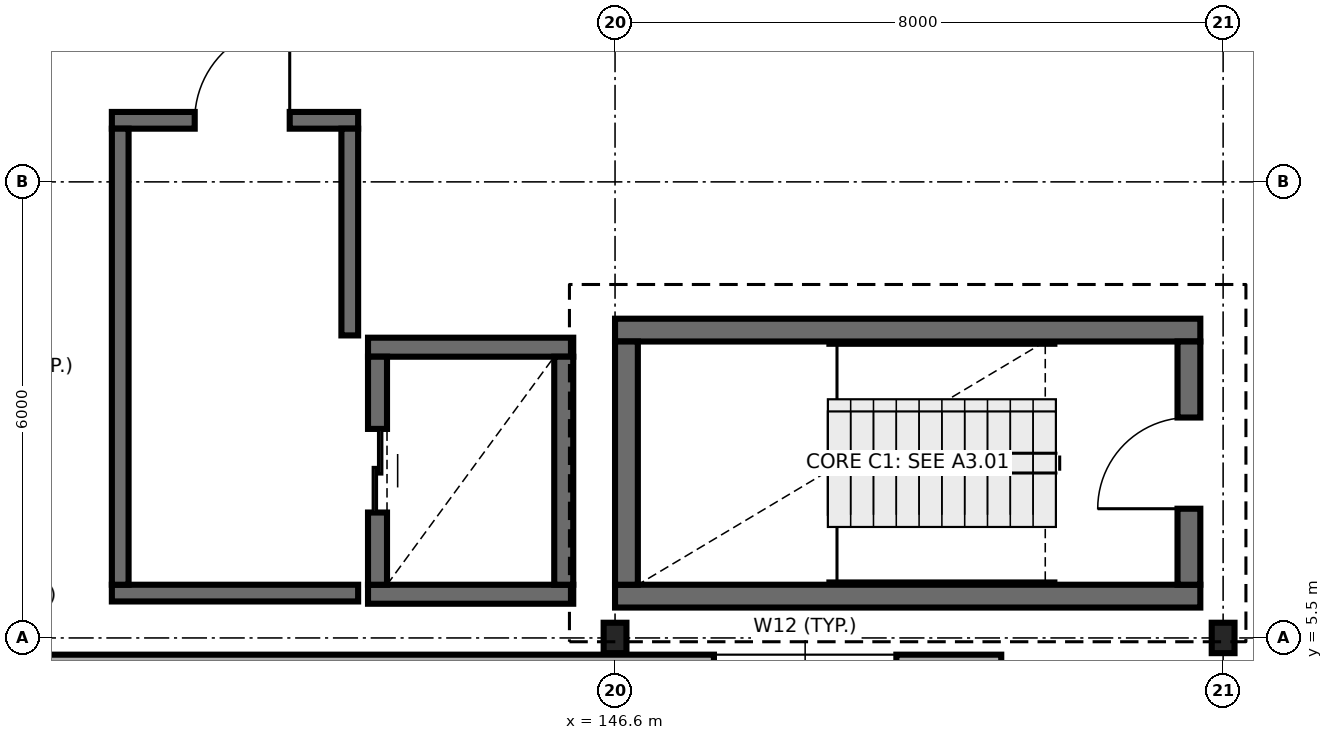
"""IFC4 building model, lengths in metres.
Left out: names, types, materials, properties, quantities, classifications, styles, units other than length and angle.
Written with IfcOpenShell. Run it as: python <this file> out.ifc"""

import sys

from ifc_helpers import new_model, si_unit, direction, frame, frame_2d, origin, origin_2d, place, context, subcontext, project, spatial, rectangle, i_section, extrude, element, fill, save


model = new_model("IFC4")
c1 = context("Model", 3, precision=1e-05, world=origin(), true_north=direction((0.0, 1.0)))
c2 = subcontext(c1, "Body", "Model", "MODEL_VIEW")
j1 = project(units=[si_unit("LENGTHUNIT", "METRE"), si_unit("PLANEANGLEUNIT", "RADIAN")], contexts=[c1])
p1 = place(None, origin())
s1 = spatial("IfcSite", under=j1, at=p1, CompositionType="ELEMENT")
p2 = place(p1, origin())
s2 = spatial("IfcBuilding", under=s1, at=p2, CompositionType="ELEMENT")
p3 = place(p2, frame((0.0, 0.0, 38.4)))
s3 = spatial("IfcBuildingStorey", under=s2, at=p3, CompositionType="ELEMENT", Elevation=38.4)
for number, where, z_axis, x_axis in (
    (1, (146.6, 5.5, 0.0), (0.0, 0.0, 1.0), (1.0, 0.0, 0.0)),
    (2, (154.6, 5.5, 0.0), (0.0, 0.0, 1.0), (1.0, 0.0, 0.0)),
):
    element("IfcColumn", number, at=place(p3, frame(where, z_axis=z_axis, x_axis=x_axis)), inside=s3, PredefinedType="COLUMN", context=c2, shape_type="SweptSolid", body=[
        extrude(i_section(OverallWidth=0.3, OverallDepth=0.4, WebThickness=0.013, FlangeThickness=0.024, FilletRadius=0.027, at=origin_2d()), origin(), (0.0, 0.0, 1.0), 3.9),
    ])
for number, where, z_axis, x_axis in (
    (3, (146.6, 6.05, 0.0), (0.0, 0.0, 1.0), (1.0, 0.0, 0.0)),
    (4, (154.3, 9.55, 0.0), (0.0, 0.0, 1.0), (-1.0, 0.0, 0.0)),
):
    element("IfcWall", number, at=place(p3, frame(where, z_axis=z_axis, x_axis=x_axis)), inside=s3, PredefinedType="SHEAR", context=c2, shape_type="SweptSolid", body=[
        extrude(rectangle(XDim=7.7, YDim=0.3, at=frame_2d((3.85, 0.0))), origin(), (0.0, 0.0, 1.0), 3.9),
    ])
p4 = place(p3, frame((146.75, 9.4, 0.0), z_axis=(0.0, 0.0, 1.0), x_axis=(0.0, -1.0, 0.0)))
e5 = element("IfcWall", 5, at=p4, inside=s3, PredefinedType="SHEAR", context=c2, shape_type="SweptSolid", body=[
    extrude(rectangle(XDim=3.2, YDim=0.3, at=frame_2d((1.6, 0.0))), origin(), (0.0, 0.0, 1.0), 3.9),
])
p5 = place(p3, frame((154.15, 6.2, 0.0), z_axis=(0.0, 0.0, 1.0), x_axis=(0.0, 1.0, 0.0)))
e6 = element("IfcWall", 6, at=p5, inside=s3, PredefinedType="SHEAR", context=c2, shape_type="SweptSolid", body=[
    extrude(rectangle(XDim=3.2, YDim=0.3, at=frame_2d((1.6, 0.0))), origin(), (0.0, 0.0, 1.0), 3.9),
])
p6 = place(p5, frame((1.0, 0.0, 0.0)))
e7 = element("IfcOpeningElement", 7, at=p6, cuts=e6, PredefinedType="OPENING", context=c2, shape_type="SweptSolid", body=[
    extrude(rectangle(XDim=1.2, YDim=2.15, at=frame_2d((0.6, 1.075))), frame((0.0, 0.16, 0.0), z_axis=(0.0, -1.0, 0.0), x_axis=(1.0, 0.0, 0.0)), (0.0, 0.0, 1.0), 0.32),
])
for number, where, z_axis, x_axis in (
    (8, (143.35, 6.075, 0.0), (0.0, 0.0, 1.0), (1.0, 0.0, 0.0)),
    (9, (146.05, 9.325, 0.0), (0.0, 0.0, 1.0), (-1.0, 0.0, 0.0)),
):
    element("IfcWall", number, at=place(p3, frame(where, z_axis=z_axis, x_axis=x_axis)), inside=s3, PredefinedType="SHEAR", context=c2, shape_type="SweptSolid", body=[
        extrude(rectangle(XDim=2.7, YDim=0.25, at=frame_2d((1.35, 0.0))), origin(), (0.0, 0.0, 1.0), 3.9),
    ])
p7 = place(p3, frame((143.475, 9.2, 0.0), z_axis=(0.0, 0.0, 1.0), x_axis=(0.0, -1.0, 0.0)))
e10 = element("IfcWall", 10, at=p7, inside=s3, PredefinedType="SHEAR", context=c2, shape_type="SweptSolid", body=[
    extrude(rectangle(XDim=3.0, YDim=0.25, at=frame_2d((1.5, 0.0))), origin(), (0.0, 0.0, 1.0), 3.9),
])
p8 = place(p7, frame((0.95, 0.0, 0.0)))
e11 = element("IfcOpeningElement", 11, at=p8, cuts=e10, PredefinedType="OPENING", context=c2, shape_type="SweptSolid", body=[
    extrude(rectangle(XDim=1.1, YDim=2.15, at=frame_2d((0.55, 1.075))), frame((0.0, 0.135, 0.0), z_axis=(0.0, -1.0, 0.0), x_axis=(1.0, 0.0, 0.0)), (0.0, 0.0, 1.0), 0.27),
])
p9 = place(p3, frame((145.925, 6.2, 0.0), z_axis=(0.0, 0.0, 1.0), x_axis=(0.0, 1.0, 0.0)))
e12 = element("IfcWall", 12, at=p9, inside=s3, PredefinedType="SHEAR", context=c2, shape_type="SweptSolid", body=[
    extrude(rectangle(XDim=3.0, YDim=0.25, at=frame_2d((1.5, 0.0))), origin(), (0.0, 0.0, 1.0), 3.9),
])
p10 = place(p3, frame((139.98, 6.09, 0.0), z_axis=(0.0, 0.0, 1.0), x_axis=(1.0, 0.0, 0.0)))
e13 = element("IfcWall", 13, at=p10, inside=s3, PredefinedType="SOLIDWALL", context=c2, shape_type="SweptSolid", body=[
    extrude(rectangle(XDim=3.24, YDim=0.22, at=frame_2d((1.62, 0.0))), origin(), (0.0, 0.0, 1.0), 3.7),
])
p11 = place(p3, frame((143.22, 12.31, 0.0), z_axis=(0.0, 0.0, 1.0), x_axis=(-1.0, 0.0, 0.0)))
e14 = element("IfcWall", 14, at=p11, inside=s3, PredefinedType="SOLIDWALL", context=c2, shape_type="SweptSolid", body=[
    extrude(rectangle(XDim=3.24, YDim=0.22, at=frame_2d((1.62, 0.0))), origin(), (0.0, 0.0, 1.0), 3.7),
])
p12 = place(p11, frame((0.9, 0.0, 0.0)))
e15 = element("IfcOpeningElement", 15, at=p12, cuts=e14, PredefinedType="OPENING", context=c2, shape_type="SweptSolid", body=[
    extrude(rectangle(XDim=1.25, YDim=2.15, at=frame_2d((0.625, 1.075))), frame((0.0, 0.12, 0.0), z_axis=(0.0, -1.0, 0.0), x_axis=(1.0, 0.0, 0.0)), (0.0, 0.0, 1.0), 0.24),
])
p13 = place(p3, frame((140.09, 12.2, 0.0), z_axis=(0.0, 0.0, 1.0), x_axis=(0.0, -1.0, 0.0)))
e16 = element("IfcWall", 16, at=p13, inside=s3, PredefinedType="SOLIDWALL", context=c2, shape_type="SweptSolid", body=[
    extrude(rectangle(XDim=6.0, YDim=0.22, at=frame_2d((3.0, 0.0))), origin(), (0.0, 0.0, 1.0), 3.7),
])
p14 = place(p3, frame((143.11, 9.48, 0.0), z_axis=(0.0, 0.0, 1.0), x_axis=(0.0, 1.0, 0.0)))
e17 = element("IfcWall", 17, at=p14, inside=s3, PredefinedType="SOLIDWALL", context=c2, shape_type="SweptSolid", body=[
    extrude(rectangle(XDim=2.72, YDim=0.22, at=frame_2d((1.36, 0.0))), origin(), (0.0, 0.0, 1.0), 3.7),
])
p15 = place(p3, frame((138.962, 5.09, 0.0), z_axis=(0.0, 0.0, 1.0), x_axis=(1.0, 0.0, 0.0)))
e18 = element("IfcWall", 18, at=p15, inside=s3, PredefinedType="SOLIDWALL", context=c2, shape_type="SweptSolid", body=[
    extrude(rectangle(XDim=12.719, YDim=0.38, at=frame_2d((6.359, 0.0))), origin(), (0.0, 0.0, 1.0), 3.7),
])
p16 = place(p15, frame((8.939, 0.0, 0.9)))
e19 = element("IfcOpeningElement", 19, at=p16, cuts=e18, PredefinedType="OPENING", context=c2, shape_type="SweptSolid", body=[
    extrude(rectangle(XDim=2.4, YDim=2.1, at=frame_2d((1.2, 1.05))), frame((0.0, 0.2, 0.0), z_axis=(0.0, -1.0, 0.0), x_axis=(1.0, 0.0, 0.0)), (0.0, 0.0, 1.0), 0.4),
])
p17 = place(p6, origin())
e20 = element("IfcDoor", 20, at=p17, inside=s3, OperationType="SINGLE_SWING_LEFT", PredefinedType="DOOR", context=c2, shape_type="SweptSolid", body=[
    extrude(rectangle(XDim=1.2, YDim=2.15, at=frame_2d((0.6, 1.075))), frame((0.0, 0.025, 0.0), z_axis=(0.0, -1.0, 0.0), x_axis=(1.0, 0.0, 0.0)), (0.0, 0.0, 1.0), 0.05),
])
fill(e7, e20)
p18 = place(p8, origin())
e21 = element("IfcDoor", 21, at=p18, inside=s3, OperationType="DOUBLE_DOOR_SLIDING", PredefinedType="DOOR", context=c2, shape_type="SweptSolid", body=[
    extrude(rectangle(XDim=1.1, YDim=2.15, at=frame_2d((0.55, 1.075))), frame((0.0, 0.025, 0.0), z_axis=(0.0, -1.0, 0.0), x_axis=(1.0, 0.0, 0.0)), (0.0, 0.0, 1.0), 0.05),
])
fill(e11, e21)
p19 = place(p12, frame((1.25, 0.0, 0.0), z_axis=(0.0, 0.0, 1.0), x_axis=(-1.0, 0.0, 0.0)))
e22 = element("IfcDoor", 22, at=p19, inside=s3, OperationType="SINGLE_SWING_LEFT", PredefinedType="DOOR", context=c2, shape_type="SweptSolid", body=[
    extrude(rectangle(XDim=1.25, YDim=2.15, at=frame_2d((0.625, 1.075))), frame((0.0, 0.025, 0.0), z_axis=(0.0, -1.0, 0.0), x_axis=(1.0, 0.0, 0.0)), (0.0, 0.0, 1.0), 0.05),
])
fill(e15, e22)
save(model, sys.argv[1])
